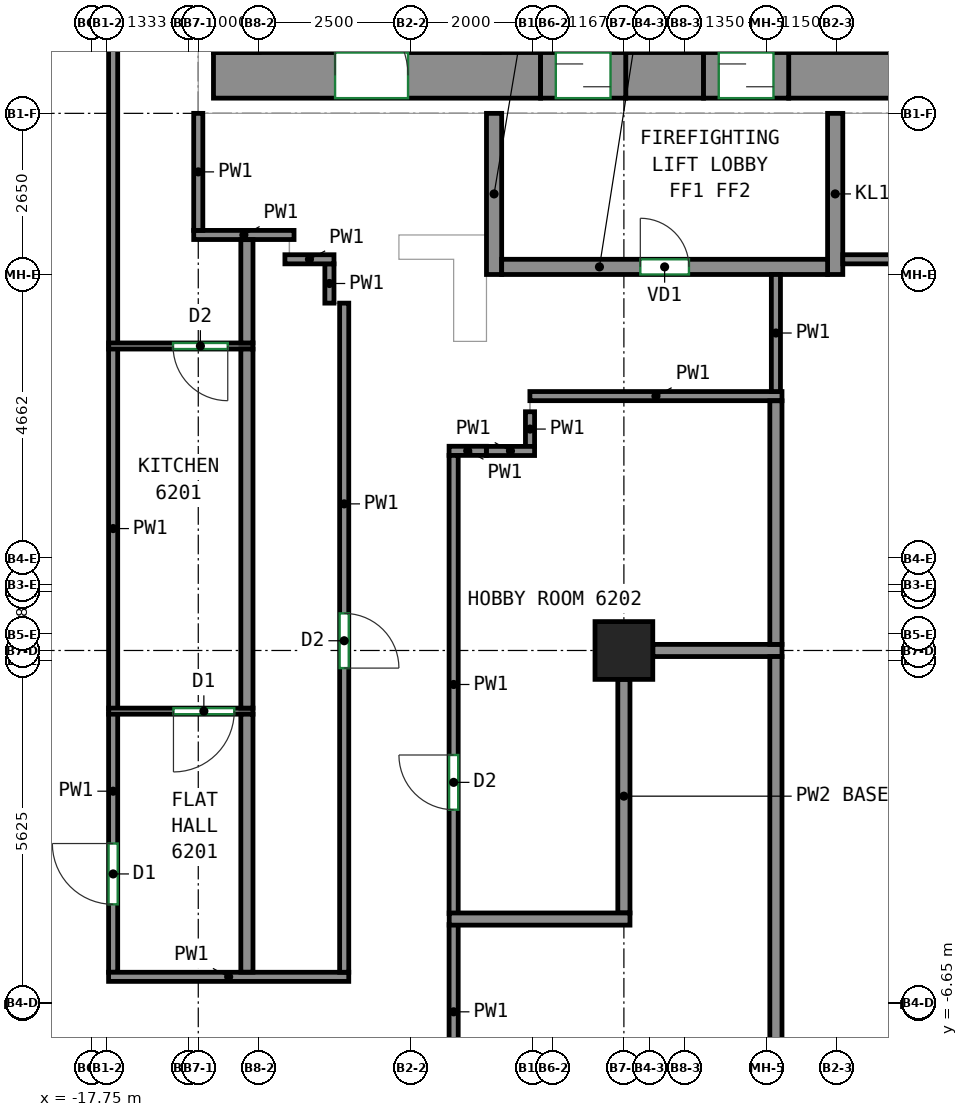
"""IFC4 building model, lengths in metres.
Left out: names, types, materials, properties, quantities, classifications, styles, units other than length and angle.
Written with IfcOpenShell. Run it as: python <this file> out.ifc"""

import sys

from ifc_helpers import new_model, si_unit, direction, frame, frame_2d, origin, origin_2d, place, context, subcontext, project, spatial, rectangle, extrude, source, transform, mapped, element, fill, save


model = new_model("IFC4")
c1 = context("Model", 3, precision=1e-05, world=origin(), true_north=direction((0.0, 1.0)))
c2 = subcontext(c1, "Body", "Model", "MODEL_VIEW")
j1 = project(units=[si_unit("LENGTHUNIT", "METRE"), si_unit("PLANEANGLEUNIT", "RADIAN")], contexts=[c1])
p1 = place(None, origin())
s1 = spatial("IfcSite", under=j1, at=p1, CompositionType="ELEMENT")
p2 = place(p1, origin())
s2 = spatial("IfcBuilding", under=s1, at=p2, CompositionType="ELEMENT")
p3 = place(p2, frame((0.0, 0.0, 256.0)))
s3 = spatial("IfcBuildingStorey", under=s2, at=p3, CompositionType="ELEMENT", Elevation=256.0)
m1 = source(origin(), c2, "Body", "SweptSolid", [
    extrude(rectangle(XDim=0.95, YDim=0.95, at=origin_2d()), origin(), (0.0, 0.0, 1.0), 3.12),
])
p4 = place(p3, frame((-9.0, -0.833, 0.0), z_axis=(0.0, 0.0, 1.0), x_axis=(1.0, 0.0, 0.0)))
e1 = element("IfcColumn", 1, at=p4, inside=s3, PredefinedType="COLUMN", context=c2, shape_type="MappedRepresentation", body=[
    mapped(m1, transform((0.0, 0.0, 0.0))),
])
m2 = source(origin(), c2, "Body", "SweptSolid", [
    extrude(rectangle(XDim=5.38, YDim=0.75, at=frame_2d((2.69, 0.0))), origin(), (0.0, 0.0, 1.0), 3.12),
])
p5 = place(p3, frame((-15.75, 8.625, 0.0), z_axis=(0.0, 0.0, 1.0), x_axis=(1.0, 0.0, 0.0)))
e2 = element("IfcWall", 2, at=p5, inside=s3, PredefinedType="SHEAR", context=c2, shape_type="MappedRepresentation", body=[
    mapped(m2, transform((0.0, 0.0, 0.0))),
])
p6 = place(p5, frame((2.0, 0.0, 0.0)))
e3 = element("IfcOpeningElement", 3, at=p6, cuts=e2, PredefinedType="OPENING", context=c2, shape_type="SweptSolid", body=[
    extrude(rectangle(XDim=1.2, YDim=2.1, at=frame_2d((0.6, 1.05))), frame((0.0, 0.385, 0.0), z_axis=(0.0, -1.0, 0.0), x_axis=(1.0, 0.0, 0.0)), (0.0, 0.0, 1.0), 0.77),
])
m3 = source(origin(), c2, "Body", "SweptSolid", [
    extrude(rectangle(XDim=1.28, YDim=0.75, at=frame_2d((0.64, 0.0))), origin(), (0.0, 0.0, 1.0), 3.12),
])
p7 = place(p3, frame((-8.97, 8.625, 0.0), z_axis=(0.0, 0.0, 1.0), x_axis=(1.0, 0.0, 0.0)))
e4 = element("IfcWall", 4, at=p7, inside=s3, PredefinedType="SHEAR", context=c2, shape_type="MappedRepresentation", body=[
    mapped(m3, transform((0.0, 0.0, 0.0))),
])
m4 = source(origin(), c2, "Body", "SweptSolid", [
    extrude(rectangle(XDim=14.18, YDim=0.75, at=frame_2d((7.09, 0.0))), origin(), (0.0, 0.0, 1.0), 3.12),
])
p8 = place(p3, frame((-6.29, 8.625, 0.0), z_axis=(0.0, 0.0, 1.0), x_axis=(1.0, 0.0, 0.0)))
e5 = element("IfcWall", 5, at=p8, inside=s3, PredefinedType="SHEAR", context=c2, shape_type="MappedRepresentation", body=[
    mapped(m4, transform((0.0, 0.0, 0.0))),
])
m5 = source(origin(), c2, "Body", "SweptSolid", [
    extrude(rectangle(XDim=2.65, YDim=0.25, at=frame_2d((1.325, 0.0))), origin(), (0.0, 0.0, 1.0), 2.57),
])
for number, where, z_axis, x_axis in (
    (6, (-11.135, 5.35, 0.0), (0.0, 0.0, 1.0), (0.0, 1.0, 0.0)),
    (7, (-5.525, 5.35, 0.0), (0.0, 0.0, 1.0), (0.0, 1.0, 0.0)),
):
    element("IfcWall", number, at=place(p3, frame(where, z_axis=z_axis, x_axis=x_axis)), inside=s3, PredefinedType="PARTITIONING", context=c2, shape_type="MappedRepresentation", body=[
        mapped(m5, transform((0.0, 0.0, 0.0))),
    ])
m6 = source(origin(), c2, "Body", "SweptSolid", [
    extrude(rectangle(XDim=5.36, YDim=0.25, at=frame_2d((2.68, 0.0))), origin(), (0.0, 0.0, 1.0), 3.12),
])
p9 = place(p3, frame((-11.01, 5.475, 0.0), z_axis=(0.0, 0.0, 1.0), x_axis=(1.0, 0.0, 0.0)))
e8 = element("IfcWall", 8, at=p9, inside=s3, PredefinedType="PARTITIONING", context=c2, shape_type="MappedRepresentation", body=[
    mapped(m6, transform((0.0, 0.0, 0.0))),
])
p10 = place(p9, frame((2.28, 0.0, 0.0)))
e9 = element("IfcOpeningElement", 9, at=p10, cuts=e8, PredefinedType="OPENING", context=c2, shape_type="SweptSolid", body=[
    extrude(rectangle(XDim=0.8, YDim=2.0, at=frame_2d((0.4, 1.0))), frame((0.0, 0.135, 0.0), z_axis=(0.0, -1.0, 0.0), x_axis=(1.0, 0.0, 0.0)), (0.0, 0.0, 1.0), 0.27),
])
m7 = source(origin(), c2, "Body", "SweptSolid", [
    extrude(rectangle(XDim=1.4, YDim=0.75, at=frame_2d((0.7, 0.0))), origin(), (0.0, 0.0, 1.0), 2.7),
])
p11 = place(p3, frame((-10.37, 8.625, 0.0), z_axis=(0.0, 0.0, 1.0), x_axis=(1.0, 0.0, 0.0)))
e10 = element("IfcWall", 10, at=p11, inside=s3, PredefinedType="PARTITIONING", context=c2, shape_type="MappedRepresentation", body=[
    mapped(m7, transform((0.0, 0.0, 0.0))),
])
p12 = place(p11, frame((0.25, 0.0, 0.0)))
e11 = element("IfcOpeningElement", 11, at=p12, cuts=e10, PredefinedType="OPENING", context=c2, shape_type="SweptSolid", body=[
    extrude(rectangle(XDim=0.9, YDim=2.1, at=frame_2d((0.45, 1.05))), frame((0.0, 0.385, 0.0), z_axis=(0.0, -1.0, 0.0), x_axis=(1.0, 0.0, 0.0)), (0.0, 0.0, 1.0), 0.77),
])
m8 = source(origin(), c2, "Body", "SweptSolid", [
    extrude(rectangle(XDim=1.4, YDim=0.75, at=frame_2d((0.7, 0.0))), origin(), (0.0, 0.0, 1.0), 2.7),
])
p13 = place(p3, frame((-7.69, 8.625, 0.0), z_axis=(0.0, 0.0, 1.0), x_axis=(1.0, 0.0, 0.0)))
e12 = element("IfcWall", 12, at=p13, inside=s3, PredefinedType="PARTITIONING", context=c2, shape_type="MappedRepresentation", body=[
    mapped(m8, transform((0.0, 0.0, 0.0))),
])
p14 = place(p13, frame((0.25, 0.0, 0.0)))
e13 = element("IfcOpeningElement", 13, at=p14, cuts=e12, PredefinedType="OPENING", context=c2, shape_type="SweptSolid", body=[
    extrude(rectangle(XDim=0.9, YDim=2.1, at=frame_2d((0.45, 1.05))), frame((0.0, 0.385, 0.0), z_axis=(0.0, -1.0, 0.0), x_axis=(1.0, 0.0, 0.0)), (0.0, 0.0, 1.0), 0.77),
])
p15 = place(p3, frame((-17.4, -6.125, 0.0), z_axis=(0.0, 0.0, 1.0), x_axis=(0.0, 1.0, 0.0)))
e14 = element("IfcWall", 14, at=p15, inside=s3, PredefinedType="PARTITIONING", context=c2, shape_type="SweptSolid", body=[
    extrude(rectangle(XDim=4.254, YDim=0.15, at=frame_2d((2.127, 0.0))), origin(), (0.0, 0.0, 1.0), 3.12),
])
p16 = place(p15, frame((1.117, 0.0, 0.0)))
e15 = element("IfcOpeningElement", 15, at=p16, cuts=e14, PredefinedType="OPENING", context=c2, shape_type="SweptSolid", body=[
    extrude(rectangle(XDim=1.0, YDim=2.1, at=frame_2d((0.5, 1.05))), frame((0.0, 0.085, 0.0), z_axis=(0.0, -1.0, 0.0), x_axis=(1.0, 0.0, 0.0)), (0.0, 0.0, 1.0), 0.17),
])
p17 = place(p3, frame((-17.475, -6.2, 0.0), z_axis=(0.0, 0.0, 1.0), x_axis=(1.0, 0.0, 0.0)))
e16 = element("IfcWall", 16, at=p17, inside=s3, PredefinedType="PARTITIONING", context=c2, shape_type="SweptSolid", body=[
    extrude(rectangle(XDim=3.95, YDim=0.15, at=frame_2d((1.975, 0.0))), origin(), (0.0, 0.0, 1.0), 3.12),
])
p18 = place(p3, frame((-17.4, -1.791, 0.0), z_axis=(0.0, 0.0, 1.0), x_axis=(0.0, 1.0, 0.0)))
e17 = element("IfcWall", 17, at=p18, inside=s3, PredefinedType="PARTITIONING", context=c2, shape_type="SweptSolid", body=[
    extrude(rectangle(XDim=5.925, YDim=0.15, at=frame_2d((2.962, 0.0))), origin(), (0.0, 0.0, 1.0), 3.12),
])
p19 = place(p3, frame((-17.4, 4.214, 0.0), z_axis=(0.0, 0.0, 1.0), x_axis=(0.0, 1.0, 0.0)))
e18 = element("IfcWall", 18, at=p19, inside=s3, PredefinedType="PARTITIONING", context=c2, shape_type="SweptSolid", body=[
    extrude(rectangle(XDim=12.477, YDim=0.15, at=frame_2d((6.238, 0.0))), origin(), (0.0, 0.0, 1.0), 3.12),
])
p20 = place(p3, frame((-16.075, 6.0, 0.0), z_axis=(0.0, 0.0, 1.0), x_axis=(1.0, 0.0, 0.0)))
e19 = element("IfcWall", 19, at=p20, inside=s3, PredefinedType="PARTITIONING", context=c2, shape_type="SweptSolid", body=[
    extrude(rectangle(XDim=1.65, YDim=0.15, at=frame_2d((0.825, 0.0))), origin(), (0.0, 0.0, 1.0), 3.12),
])
p21 = place(p3, frame((-16.0, 6.075, 0.0), z_axis=(0.0, 0.0, 1.0), x_axis=(0.0, 1.0, 0.0)))
e20 = element("IfcWall", 20, at=p21, inside=s3, PredefinedType="PARTITIONING", context=c2, shape_type="SweptSolid", body=[
    extrude(rectangle(XDim=1.925, YDim=0.15, at=frame_2d((0.962, 0.0))), origin(), (0.0, 0.0, 1.0), 3.12),
])
p22 = place(p3, frame((-13.6, 4.879, 0.0), z_axis=(0.0, 0.0, 1.0), x_axis=(0.0, -1.0, 0.0)))
e21 = element("IfcWall", 21, at=p22, inside=s3, PredefinedType="PARTITIONING", context=c2, shape_type="SweptSolid", body=[
    extrude(rectangle(XDim=11.004, YDim=0.15, at=frame_2d((5.502, 0.0))), origin(), (0.0, 0.0, 1.0), 3.12),
])
p23 = place(p22, frame((5.102, 0.0, 0.0)))
e22 = element("IfcOpeningElement", 22, at=p23, cuts=e21, PredefinedType="OPENING", context=c2, shape_type="SweptSolid", body=[
    extrude(rectangle(XDim=0.9, YDim=2.1, at=frame_2d((0.45, 1.05))), frame((0.0, 0.085, 0.0), z_axis=(0.0, -1.0, 0.0), x_axis=(1.0, 0.0, 0.0)), (0.0, 0.0, 1.0), 0.17),
])
p24 = place(p3, frame((-13.843, 5.525, 0.0), z_axis=(0.0, 0.0, 1.0), x_axis=(0.0, -1.0, 0.0)))
e23 = element("IfcWall", 23, at=p24, inside=s3, PredefinedType="PARTITIONING", context=c2, shape_type="SweptSolid", body=[
    extrude(rectangle(XDim=0.646, YDim=0.15, at=frame_2d((0.323, 0.0))), origin(), (0.0, 0.0, 1.0), 3.12),
])
p25 = place(p3, frame((-14.575, 5.6, 0.0), z_axis=(0.0, 0.0, 1.0), x_axis=(1.0, 0.0, 0.0)))
e24 = element("IfcWall", 24, at=p25, inside=s3, PredefinedType="PARTITIONING", context=c2, shape_type="SweptSolid", body=[
    extrude(rectangle(XDim=0.807, YDim=0.15, at=frame_2d((0.403, 0.0))), origin(), (0.0, 0.0, 1.0), 3.12),
])
p26 = place(p3, frame((-10.546, 3.35, 0.0), z_axis=(0.0, 0.0, 1.0), x_axis=(1.0, 0.0, 0.0)))
e25 = element("IfcWall", 25, at=p26, inside=s3, PredefinedType="PARTITIONING", context=c2, shape_type="SweptSolid", body=[
    extrude(rectangle(XDim=4.146, YDim=0.15, at=frame_2d((2.073, 0.0))), origin(), (0.0, 0.0, 1.0), 3.12),
])
p27 = place(p3, frame((-10.544, 2.523, 0.0), z_axis=(0.0, 0.0, 1.0), x_axis=(0.0, 1.0, 0.0)))
e26 = element("IfcWall", 26, at=p27, inside=s3, PredefinedType="PARTITIONING", context=c2, shape_type="SweptSolid", body=[
    extrude(rectangle(XDim=0.57, YDim=0.15, at=frame_2d((0.285, 0.0))), origin(), (0.0, 0.0, 1.0), 3.12),
])
p28 = place(p3, frame((-11.262, 2.448, 0.0), z_axis=(0.0, 0.0, 1.0), x_axis=(1.0, 0.0, 0.0)))
e27 = element("IfcWall", 27, at=p28, inside=s3, PredefinedType="PARTITIONING", context=c2, shape_type="SweptSolid", body=[
    extrude(rectangle(XDim=0.793, YDim=0.15, at=frame_2d((0.396, 0.0))), origin(), (0.0, 0.0, 1.0), 3.12),
])
p29 = place(p3, frame((-11.875, 2.45, 0.0), z_axis=(0.0, 0.0, 1.0), x_axis=(1.0, 0.0, 0.0)))
e28 = element("IfcWall", 28, at=p29, inside=s3, PredefinedType="PARTITIONING", context=c2, shape_type="SweptSolid", body=[
    extrude(rectangle(XDim=0.613, YDim=0.15, at=frame_2d((0.307, 0.0))), origin(), (0.0, 0.0, 1.0), 3.12),
])
p30 = place(p3, frame((-11.8, -5.16, 0.0), z_axis=(0.0, 0.0, 1.0), x_axis=(0.0, 1.0, 0.0)))
e29 = element("IfcWall", 29, at=p30, inside=s3, PredefinedType="PARTITIONING", context=c2, shape_type="SweptSolid", body=[
    extrude(rectangle(XDim=7.535, YDim=0.15, at=frame_2d((3.768, 0.0))), origin(), (0.0, 0.0, 1.0), 3.12),
])
p31 = place(p30, frame((1.708, 0.0, 0.0)))
e30 = element("IfcOpeningElement", 30, at=p31, cuts=e29, PredefinedType="OPENING", context=c2, shape_type="SweptSolid", body=[
    extrude(rectangle(XDim=0.9, YDim=2.1, at=frame_2d((0.45, 1.05))), frame((0.0, 0.085, 0.0), z_axis=(0.0, -1.0, 0.0), x_axis=(1.0, 0.0, 0.0)), (0.0, 0.0, 1.0), 0.17),
])
p32 = place(p3, frame((-11.8, -10.125, 0.0), z_axis=(0.0, 0.0, 1.0), x_axis=(0.0, 1.0, 0.0)))
e31 = element("IfcWall", 31, at=p32, inside=s3, PredefinedType="PARTITIONING", context=c2, shape_type="SweptSolid", body=[
    extrude(rectangle(XDim=4.785, YDim=0.15, at=frame_2d((2.393, 0.0))), origin(), (0.0, 0.0, 1.0), 3.12),
])
p33 = place(p32, frame((1.123, 0.0, 0.0)))
e32 = element("IfcOpeningElement", 32, at=p33, cuts=e31, PredefinedType="OPENING", context=c2, shape_type="SweptSolid", body=[
    extrude(rectangle(XDim=0.9, YDim=2.1, at=frame_2d((0.45, 1.05))), frame((0.0, 0.085, 0.0), z_axis=(0.0, -1.0, 0.0), x_axis=(1.0, 0.0, 0.0)), (0.0, 0.0, 1.0), 0.17),
])
p34 = place(p3, frame((-6.5, 3.425, 0.0), z_axis=(0.0, 0.0, 1.0), x_axis=(0.0, 1.0, 0.0)))
e33 = element("IfcWall", 33, at=p34, inside=s3, PredefinedType="PARTITIONING", context=c2, shape_type="SweptSolid", body=[
    extrude(rectangle(XDim=1.925, YDim=0.15, at=frame_2d((0.962, 0.0))), origin(), (0.0, 0.0, 1.0), 3.12),
])
p35 = place(p3, frame((-5.4, 5.6, 0.0), z_axis=(0.0, 0.0, 1.0), x_axis=(1.0, 0.0, 0.0)))
e34 = element("IfcWall", 34, at=p35, inside=s3, PredefinedType="PARTITIONING", context=c2, shape_type="SweptSolid", body=[
    extrude(rectangle(XDim=13.975, YDim=0.15, at=frame_2d((6.987, 0.0))), origin(), (0.0, 0.0, 1.0), 3.12),
])
p36 = place(p3, frame((-15.1, -1.831, 0.0), z_axis=(0.0, 0.0, 1.0), x_axis=(-1.0, 0.0, 0.0)))
e35 = element("IfcWall", 35, at=p36, inside=s3, PredefinedType="PARTITIONING", context=c2, shape_type="SweptSolid", body=[
    extrude(rectangle(XDim=2.373, YDim=0.1, at=frame_2d((1.187, 0.0))), origin(), (0.0, 0.0, 1.0), 3.12),
])
p37 = place(p36, frame((0.308, 0.0, 0.0)))
e36 = element("IfcOpeningElement", 36, at=p37, cuts=e35, PredefinedType="OPENING", context=c2, shape_type="SweptSolid", body=[
    extrude(rectangle(XDim=1.0, YDim=2.1, at=frame_2d((0.5, 1.05))), frame((0.0, 0.06, 0.0), z_axis=(0.0, -1.0, 0.0), x_axis=(1.0, 0.0, 0.0)), (0.0, 0.0, 1.0), 0.12),
])
p38 = place(p3, frame((-15.2, -6.123, 0.0), z_axis=(0.0, 0.0, 1.0), x_axis=(0.0, 1.0, 0.0)))
e37 = element("IfcWall", 37, at=p38, inside=s3, PredefinedType="PARTITIONING", context=c2, shape_type="SweptSolid", body=[
    extrude(rectangle(XDim=4.242, YDim=0.2, at=frame_2d((2.121, 0.0))), origin(), (0.0, 0.0, 1.0), 3.12),
])
p39 = place(p3, frame((-15.1, 4.174, 0.0), z_axis=(0.0, 0.0, 1.0), x_axis=(-1.0, 0.0, 0.0)))
e38 = element("IfcWall", 38, at=p39, inside=s3, PredefinedType="PARTITIONING", context=c2, shape_type="SweptSolid", body=[
    extrude(rectangle(XDim=2.373, YDim=0.1, at=frame_2d((1.187, 0.0))), origin(), (0.0, 0.0, 1.0), 3.12),
])
p40 = place(p39, frame((0.415, 0.0, 0.0)))
e39 = element("IfcOpeningElement", 39, at=p40, cuts=e38, PredefinedType="OPENING", context=c2, shape_type="SweptSolid", body=[
    extrude(rectangle(XDim=0.9, YDim=2.1, at=frame_2d((0.45, 1.05))), frame((0.0, 0.06, 0.0), z_axis=(0.0, -1.0, 0.0), x_axis=(1.0, 0.0, 0.0)), (0.0, 0.0, 1.0), 0.12),
])
p41 = place(p3, frame((-15.2, -1.781, 0.0), z_axis=(0.0, 0.0, 1.0), x_axis=(0.0, 1.0, 0.0)))
e40 = element("IfcWall", 40, at=p41, inside=s3, PredefinedType="PARTITIONING", context=c2, shape_type="SweptSolid", body=[
    extrude(rectangle(XDim=5.905, YDim=0.2, at=frame_2d((2.953, 0.0))), origin(), (0.0, 0.0, 1.0), 3.12),
])
p42 = place(p3, frame((-15.2, 4.224, 0.0), z_axis=(0.0, 0.0, 1.0), x_axis=(0.0, 1.0, 0.0)))
e41 = element("IfcWall", 41, at=p42, inside=s3, PredefinedType="PARTITIONING", context=c2, shape_type="SweptSolid", body=[
    extrude(rectangle(XDim=1.699, YDim=0.2, at=frame_2d((0.85, 0.0))), origin(), (0.0, 0.0, 1.0), 3.12),
])
p43 = place(p3, frame((-8.525, -0.833, 0.0), z_axis=(0.0, 0.0, 1.0), x_axis=(1.0, 0.0, 0.0)))
e42 = element("IfcWall", 42, at=p43, inside=s3, PredefinedType="PARTITIONING", context=c2, shape_type="SweptSolid", body=[
    extrude(rectangle(XDim=2.125, YDim=0.2, at=frame_2d((1.062, 0.0))), origin(), (0.0, 0.0, 1.0), 3.12),
])
p44 = place(p3, frame((-9.0, -5.15, 0.0), z_axis=(0.0, 0.0, 1.0), x_axis=(0.0, 1.0, 0.0)))
e43 = element("IfcWall", 43, at=p44, inside=s3, PredefinedType="PARTITIONING", context=c2, shape_type="SweptSolid", body=[
    extrude(rectangle(XDim=3.842, YDim=0.2, at=frame_2d((1.921, 0.0))), origin(), (0.0, 0.0, 1.0), 2.57),
])
p45 = place(p3, frame((-11.873, -5.25, 0.0), z_axis=(0.0, 0.0, 1.0), x_axis=(1.0, 0.0, 0.0)))
e44 = element("IfcWall", 44, at=p45, inside=s3, PredefinedType="PARTITIONING", context=c2, shape_type="SweptSolid", body=[
    extrude(rectangle(XDim=2.973, YDim=0.2, at=frame_2d((1.487, 0.0))), origin(), (0.0, 0.0, 1.0), 3.12),
])
p46 = place(p3, frame((-6.5, -0.733, 0.0), z_axis=(0.0, 0.0, 1.0), x_axis=(0.0, 1.0, 0.0)))
e45 = element("IfcWall", 45, at=p46, inside=s3, PredefinedType="PARTITIONING", context=c2, shape_type="SweptSolid", body=[
    extrude(rectangle(XDim=4.006, YDim=0.2, at=frame_2d((2.003, 0.0))), origin(), (0.0, 0.0, 1.0), 3.12),
])
p47 = place(p3, frame((-6.5, -9.323, 0.0), z_axis=(0.0, 0.0, 1.0), x_axis=(0.0, 1.0, 0.0)))
e46 = element("IfcWall", 46, at=p47, inside=s3, PredefinedType="PARTITIONING", context=c2, shape_type="SweptSolid", body=[
    extrude(rectangle(XDim=8.39, YDim=0.2, at=frame_2d((4.195, 0.0))), origin(), (0.0, 0.0, 1.0), 3.12),
])
p48 = place(p10, origin())
e47 = element("IfcDoor", 47, at=p48, inside=s3, OperationType="SINGLE_SWING_LEFT", PredefinedType="DOOR", context=c2, shape_type="SweptSolid", body=[
    extrude(rectangle(XDim=0.8, YDim=2.0, at=frame_2d((0.4, 1.0))), frame((0.0, 0.025, 0.0), z_axis=(0.0, -1.0, 0.0), x_axis=(1.0, 0.0, 0.0)), (0.0, 0.0, 1.0), 0.05),
])
fill(e9, e47)
p49 = place(p12, origin())
e48 = element("IfcDoor", 48, at=p49, inside=s3, OperationType="SLIDING_TO_LEFT", PredefinedType="DOOR", context=c2, shape_type="SweptSolid", body=[
    extrude(rectangle(XDim=0.9, YDim=2.1, at=frame_2d((0.45, 1.05))), frame((0.0, 0.28, 0.0), z_axis=(0.0, -1.0, 0.0), x_axis=(1.0, 0.0, 0.0)), (0.0, 0.0, 1.0), 0.05),
])
fill(e11, e48)
p50 = place(p14, origin())
e49 = element("IfcDoor", 49, at=p50, inside=s3, OperationType="SLIDING_TO_RIGHT", PredefinedType="DOOR", context=c2, shape_type="SweptSolid", body=[
    extrude(rectangle(XDim=0.9, YDim=2.1, at=frame_2d((0.45, 1.05))), frame((0.0, 0.28, 0.0), z_axis=(0.0, -1.0, 0.0), x_axis=(1.0, 0.0, 0.0)), (0.0, 0.0, 1.0), 0.05),
])
fill(e13, e49)
p51 = place(p6, origin())
e50 = element("IfcDoor", 50, at=p51, inside=s3, OperationType="DOUBLE_DOOR_SINGLE_SWING", PredefinedType="DOOR", context=c2, shape_type="SweptSolid", body=[
    extrude(rectangle(XDim=1.2, YDim=2.1, at=frame_2d((0.6, 1.05))), frame((0.0, 0.28, 0.0), z_axis=(0.0, -1.0, 0.0), x_axis=(1.0, 0.0, 0.0)), (0.0, 0.0, 1.0), 0.05),
])
fill(e3, e50)
p52 = place(p16, origin())
e51 = element("IfcDoor", 51, at=p52, inside=s3, OperationType="SINGLE_SWING_RIGHT", PredefinedType="DOOR", context=c2, shape_type="SweptSolid", body=[
    extrude(rectangle(XDim=1.0, YDim=2.1, at=frame_2d((0.5, 1.05))), frame((0.0, 0.025, 0.0), z_axis=(0.0, -1.0, 0.0), x_axis=(1.0, 0.0, 0.0)), (0.0, 0.0, 1.0), 0.05),
])
fill(e15, e51)
p53 = place(p31, origin())
e52 = element("IfcDoor", 52, at=p53, inside=s3, OperationType="SINGLE_SWING_RIGHT", PredefinedType="DOOR", context=c2, shape_type="SweptSolid", body=[
    extrude(rectangle(XDim=0.9, YDim=2.1, at=frame_2d((0.45, 1.05))), frame((0.0, 0.025, 0.0), z_axis=(0.0, -1.0, 0.0), x_axis=(1.0, 0.0, 0.0)), (0.0, 0.0, 1.0), 0.05),
])
fill(e30, e52)
p54 = place(p37, origin())
e53 = element("IfcDoor", 53, at=p54, inside=s3, OperationType="SINGLE_SWING_RIGHT", PredefinedType="DOOR", context=c2, shape_type="SweptSolid", body=[
    extrude(rectangle(XDim=1.0, YDim=2.1, at=frame_2d((0.5, 1.05))), frame((0.0, 0.025, 0.0), z_axis=(0.0, -1.0, 0.0), x_axis=(1.0, 0.0, 0.0)), (0.0, 0.0, 1.0), 0.05),
])
fill(e36, e53)
p55 = place(p23, origin())
e54 = element("IfcDoor", 54, at=p55, inside=s3, OperationType="SINGLE_SWING_RIGHT", PredefinedType="DOOR", context=c2, shape_type="SweptSolid", body=[
    extrude(rectangle(XDim=0.9, YDim=2.1, at=frame_2d((0.45, 1.05))), frame((0.0, 0.025, 0.0), z_axis=(0.0, -1.0, 0.0), x_axis=(1.0, 0.0, 0.0)), (0.0, 0.0, 1.0), 0.05),
])
fill(e22, e54)
p56 = place(p40, origin())
e55 = element("IfcDoor", 55, at=p56, inside=s3, OperationType="SINGLE_SWING_LEFT", PredefinedType="DOOR", context=c2, shape_type="SweptSolid", body=[
    extrude(rectangle(XDim=0.9, YDim=2.1, at=frame_2d((0.45, 1.05))), frame((0.0, 0.025, 0.0), z_axis=(0.0, -1.0, 0.0), x_axis=(1.0, 0.0, 0.0)), (0.0, 0.0, 1.0), 0.05),
])
fill(e39, e55)
save(model, sys.argv[1])
